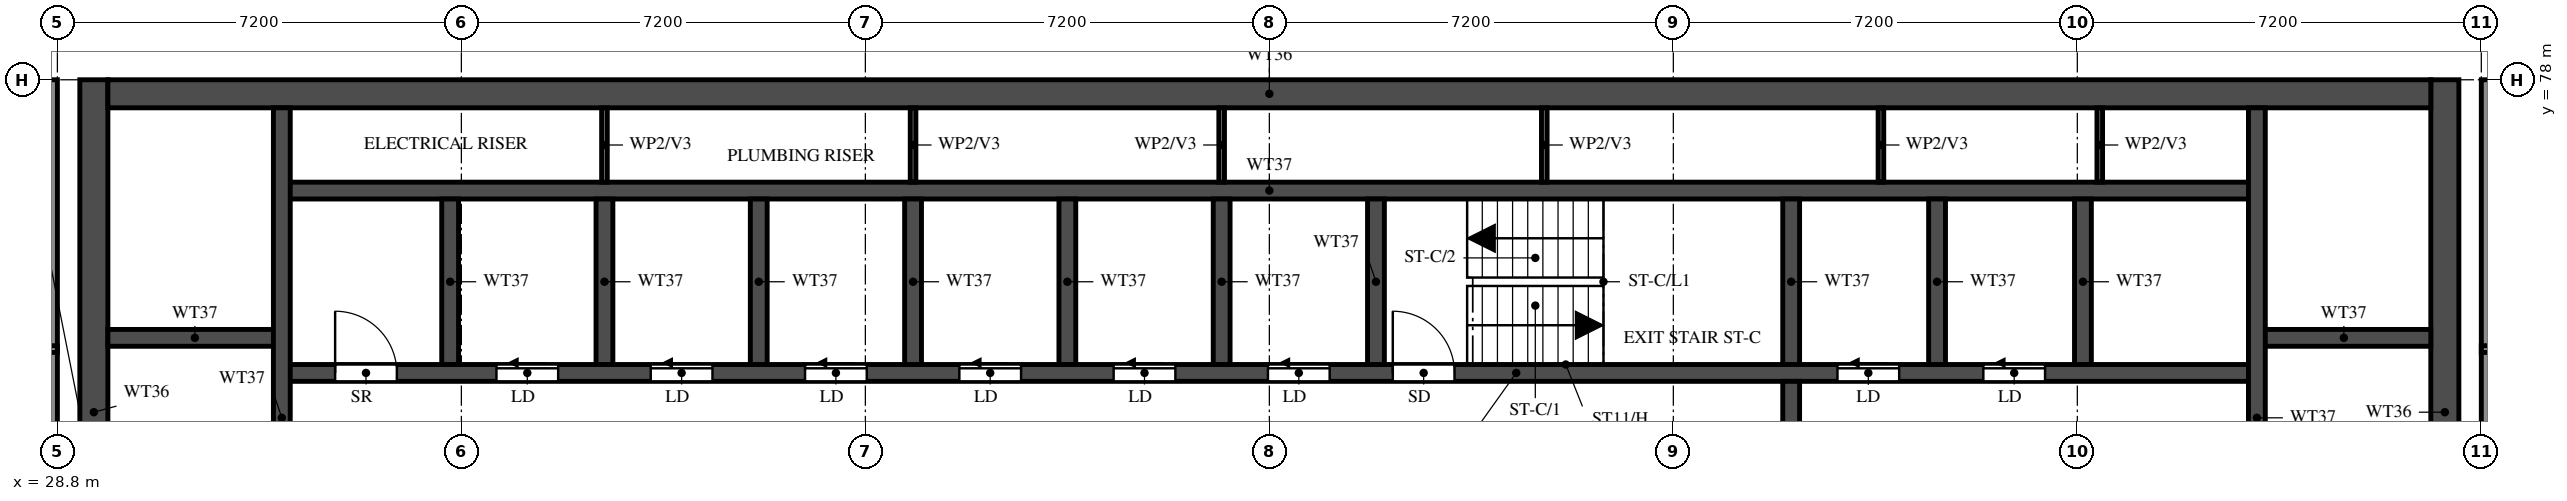
"""IFC4 building model, lengths in metres.
Left out: names, types, materials, properties, quantities, classifications, styles, units other than length and angle.
Written with IfcOpenShell. Run it as: python <this file> out.ifc"""

import sys

from ifc_helpers import new_model, si_unit, direction, frame, frame_2d, origin, place, context, subcontext, project, spatial, rectangle, extrude, element, fill, save


model = new_model("IFC4")
c1 = context("Model", 3, precision=1e-05, world=origin(), true_north=direction((0.0, 1.0)))
c2 = subcontext(c1, "Body", "Model", "MODEL_VIEW")
j1 = project(units=[si_unit("LENGTHUNIT", "METRE"), si_unit("PLANEANGLEUNIT", "RADIAN")], contexts=[c1])
p1 = place(None, origin())
s1 = spatial("IfcSite", under=j1, at=p1, CompositionType="ELEMENT")
p2 = place(p1, origin())
s2 = spatial("IfcBuilding", under=s1, at=p2, CompositionType="ELEMENT")
p3 = place(p2, frame((0.0, 0.0, 253.5)))
s3 = spatial("IfcBuildingStorey", under=s2, at=p3, CompositionType="ELEMENT", Elevation=253.5)
for number, where, z_axis, x_axis in (
    (1, (29.45, 66.15, 0.0), (0.0, 0.0, 1.0), (0.0, 1.0, 0.0)),
    (2, (71.35, 66.15, 0.0), (0.0, 0.0, 1.0), (0.0, 1.0, 0.0)),
):
    element("IfcWall", number, at=place(p3, frame(where, z_axis=z_axis, x_axis=x_axis)), inside=s3, PredefinedType="SHEAR", context=c2, shape_type="SweptSolid", body=[
        extrude(rectangle(XDim=11.85, YDim=0.5, at=frame_2d((5.925, 0.0))), origin(), (0.0, 0.0, 1.0), 3.22),
    ])
p4 = place(p3, frame((29.7, 77.75, 0.0), z_axis=(0.0, 0.0, 1.0), x_axis=(1.0, 0.0, 0.0)))
e3 = element("IfcWall", 3, at=p4, inside=s3, PredefinedType="SHEAR", context=c2, shape_type="SweptSolid", body=[
    extrude(rectangle(XDim=41.4, YDim=0.5, at=frame_2d((20.7, 0.0))), origin(), (0.0, 0.0, 1.0), 3.22),
])
p5 = place(p3, frame((32.8, 72.775, 0.0), z_axis=(0.0, 0.0, 1.0), x_axis=(1.0, 0.0, 0.0)))
e4 = element("IfcWall", 4, at=p5, inside=s3, PredefinedType="SHEAR", context=c2, shape_type="SweptSolid", body=[
    extrude(rectangle(XDim=35.2, YDim=0.3, at=frame_2d((17.6, 0.0))), origin(), (0.0, 0.0, 1.0), 3.22),
])
p6 = place(p5, frame((19.8, 0.0, 0.0)))
e5 = element("IfcOpeningElement", 5, at=p6, cuts=e4, PredefinedType="OPENING", context=c2, shape_type="SweptSolid", body=[
    extrude(rectangle(XDim=1.1, YDim=2.1, at=frame_2d((0.55, 1.05))), frame((0.0, 0.16, 0.0), z_axis=(0.0, -1.0, 0.0), x_axis=(1.0, 0.0, 0.0)), (0.0, 0.0, 1.0), 0.32),
])
p7 = place(p5, frame((27.725, 0.0, 0.0)))
e6 = element("IfcOpeningElement", 6, at=p7, cuts=e4, PredefinedType="OPENING", context=c2, shape_type="SweptSolid", body=[
    extrude(rectangle(XDim=1.1, YDim=2.1, at=frame_2d((0.55, 1.05))), frame((0.0, 0.16, 0.0), z_axis=(0.0, -1.0, 0.0), x_axis=(1.0, 0.0, 0.0)), (0.0, 0.0, 1.0), 0.32),
])
p8 = place(p5, frame((30.325, 0.0, 0.0)))
e7 = element("IfcOpeningElement", 7, at=p8, cuts=e4, PredefinedType="OPENING", context=c2, shape_type="SweptSolid", body=[
    extrude(rectangle(XDim=1.1, YDim=2.1, at=frame_2d((0.55, 1.05))), frame((0.0, 0.16, 0.0), z_axis=(0.0, -1.0, 0.0), x_axis=(1.0, 0.0, 0.0)), (0.0, 0.0, 1.0), 0.32),
])
p9 = place(p5, frame((3.825, 0.0, 0.0)))
e8 = element("IfcOpeningElement", 8, at=p9, cuts=e4, PredefinedType="OPENING", context=c2, shape_type="SweptSolid", body=[
    extrude(rectangle(XDim=1.1, YDim=2.1, at=frame_2d((0.55, 1.05))), frame((0.0, 0.16, 0.0), z_axis=(0.0, -1.0, 0.0), x_axis=(1.0, 0.0, 0.0)), (0.0, 0.0, 1.0), 0.32),
])
p10 = place(p5, frame((6.575, 0.0, 0.0)))
e9 = element("IfcOpeningElement", 9, at=p10, cuts=e4, PredefinedType="OPENING", context=c2, shape_type="SweptSolid", body=[
    extrude(rectangle(XDim=1.1, YDim=2.1, at=frame_2d((0.55, 1.05))), frame((0.0, 0.16, 0.0), z_axis=(0.0, -1.0, 0.0), x_axis=(1.0, 0.0, 0.0)), (0.0, 0.0, 1.0), 0.32),
])
p11 = place(p5, frame((9.325, 0.0, 0.0)))
e10 = element("IfcOpeningElement", 10, at=p11, cuts=e4, PredefinedType="OPENING", context=c2, shape_type="SweptSolid", body=[
    extrude(rectangle(XDim=1.1, YDim=2.1, at=frame_2d((0.55, 1.05))), frame((0.0, 0.16, 0.0), z_axis=(0.0, -1.0, 0.0), x_axis=(1.0, 0.0, 0.0)), (0.0, 0.0, 1.0), 0.32),
])
p12 = place(p5, frame((12.075, 0.0, 0.0)))
e11 = element("IfcOpeningElement", 11, at=p12, cuts=e4, PredefinedType="OPENING", context=c2, shape_type="SweptSolid", body=[
    extrude(rectangle(XDim=1.1, YDim=2.1, at=frame_2d((0.55, 1.05))), frame((0.0, 0.16, 0.0), z_axis=(0.0, -1.0, 0.0), x_axis=(1.0, 0.0, 0.0)), (0.0, 0.0, 1.0), 0.32),
])
p13 = place(p5, frame((14.825, 0.0, 0.0)))
e12 = element("IfcOpeningElement", 12, at=p13, cuts=e4, PredefinedType="OPENING", context=c2, shape_type="SweptSolid", body=[
    extrude(rectangle(XDim=1.1, YDim=2.1, at=frame_2d((0.55, 1.05))), frame((0.0, 0.16, 0.0), z_axis=(0.0, -1.0, 0.0), x_axis=(1.0, 0.0, 0.0)), (0.0, 0.0, 1.0), 0.32),
])
p14 = place(p5, frame((17.575, 0.0, 0.0)))
e13 = element("IfcOpeningElement", 13, at=p14, cuts=e4, PredefinedType="OPENING", context=c2, shape_type="SweptSolid", body=[
    extrude(rectangle(XDim=1.1, YDim=2.1, at=frame_2d((0.55, 1.05))), frame((0.0, 0.16, 0.0), z_axis=(0.0, -1.0, 0.0), x_axis=(1.0, 0.0, 0.0)), (0.0, 0.0, 1.0), 0.32),
])
p15 = place(p5, frame((0.95, 0.0, 0.0)))
e14 = element("IfcOpeningElement", 14, at=p15, cuts=e4, PredefinedType="OPENING", context=c2, shape_type="SweptSolid", body=[
    extrude(rectangle(XDim=1.1, YDim=2.1, at=frame_2d((0.55, 1.05))), frame((0.0, 0.16, 0.0), z_axis=(0.0, -1.0, 0.0), x_axis=(1.0, 0.0, 0.0)), (0.0, 0.0, 1.0), 0.32),
])
p16 = place(p3, frame((32.8, 76.025, 0.0), z_axis=(0.0, 0.0, 1.0), x_axis=(1.0, 0.0, 0.0)))
e15 = element("IfcWall", 15, at=p16, inside=s3, PredefinedType="SHEAR", context=c2, shape_type="SweptSolid", body=[
    extrude(rectangle(XDim=35.2, YDim=0.3, at=frame_2d((17.6, 0.0))), origin(), (0.0, 0.0, 1.0), 3.22),
])
for number, where, z_axis, x_axis in (
    (16, (29.7, 73.4, 0.0), (0.0, 0.0, 1.0), (1.0, 0.0, 0.0)),
    (17, (68.0, 73.4, 0.0), (0.0, 0.0, 1.0), (1.0, 0.0, 0.0)),
):
    element("IfcWall", number, at=place(p3, frame(where, z_axis=z_axis, x_axis=x_axis)), inside=s3, PredefinedType="SHEAR", context=c2, shape_type="SweptSolid", body=[
        extrude(rectangle(XDim=3.1, YDim=0.3, at=frame_2d((1.55, 0.0))), origin(), (0.0, 0.0, 1.0), 3.22),
    ])
p17 = place(p3, frame((32.8, 66.45, 0.0), z_axis=(0.0, 0.0, 1.0), x_axis=(0.0, 1.0, 0.0)))
e18 = element("IfcWall", 18, at=p17, inside=s3, PredefinedType="SHEAR", context=c2, shape_type="SweptSolid", body=[
    extrude(rectangle(XDim=11.05, YDim=0.3, at=frame_2d((5.525, 0.0))), origin(), (0.0, 0.0, 1.0), 3.22),
])
p18 = place(p3, frame((68.0, 66.45, 0.0), z_axis=(0.0, 0.0, 1.0), x_axis=(0.0, 1.0, 0.0)))
e19 = element("IfcWall", 19, at=p18, inside=s3, PredefinedType="SHEAR", context=c2, shape_type="SweptSolid", body=[
    extrude(rectangle(XDim=11.05, YDim=0.3, at=frame_2d((5.525, 0.0))), origin(), (0.0, 0.0, 1.0), 3.22),
])
p19 = place(p18, frame((0.15, 0.0, 0.0)))
e20 = element("IfcOpeningElement", 20, at=p19, cuts=e19, PredefinedType="OPENING", context=c2, shape_type="SweptSolid", body=[
    extrude(rectangle(XDim=1.1, YDim=2.1, at=frame_2d((0.55, 1.05))), frame((0.0, 0.16, 0.0), z_axis=(0.0, -1.0, 0.0), x_axis=(1.0, 0.0, 0.0)), (0.0, 0.0, 1.0), 0.32),
])
p20 = place(p3, frame((59.7, 66.45, 0.0), z_axis=(0.0, 0.0, 1.0), x_axis=(0.0, 1.0, 0.0)))
e21 = element("IfcWall", 21, at=p20, inside=s3, PredefinedType="SHEAR", context=c2, shape_type="SweptSolid", body=[
    extrude(rectangle(XDim=6.175, YDim=0.3, at=frame_2d((3.087, 0.0))), origin(), (0.0, 0.0, 1.0), 3.22),
])
p21 = place(p20, frame((3.85, 0.0, 0.0)))
e22 = element("IfcOpeningElement", 22, at=p21, cuts=e21, PredefinedType="OPENING", context=c2, shape_type="SweptSolid", body=[
    extrude(rectangle(XDim=1.2, YDim=2.1, at=frame_2d((0.6, 1.05))), frame((0.0, 0.16, 0.0), z_axis=(0.0, -1.0, 0.0), x_axis=(1.0, 0.0, 0.0)), (0.0, 0.0, 1.0), 0.32),
])
for number, where, z_axis, x_axis in (
    (23, (59.7, 72.925, 0.0), (0.0, 0.0, 1.0), (0.0, 1.0, 0.0)),
    (24, (35.8, 72.925, 0.0), (0.0, 0.0, 1.0), (0.0, 1.0, 0.0)),
    (25, (38.55, 72.925, 0.0), (0.0, 0.0, 1.0), (0.0, 1.0, 0.0)),
    (26, (41.3, 72.925, 0.0), (0.0, 0.0, 1.0), (0.0, 1.0, 0.0)),
    (27, (44.05, 72.925, 0.0), (0.0, 0.0, 1.0), (0.0, 1.0, 0.0)),
    (28, (46.8, 72.925, 0.0), (0.0, 0.0, 1.0), (0.0, 1.0, 0.0)),
    (29, (49.55, 72.925, 0.0), (0.0, 0.0, 1.0), (0.0, 1.0, 0.0)),
    (30, (52.3, 72.925, 0.0), (0.0, 0.0, 1.0), (0.0, 1.0, 0.0)),
    (31, (62.3, 72.925, 0.0), (0.0, 0.0, 1.0), (0.0, 1.0, 0.0)),
    (32, (64.9, 72.925, 0.0), (0.0, 0.0, 1.0), (0.0, 1.0, 0.0)),
):
    element("IfcWall", number, at=place(p3, frame(where, z_axis=z_axis, x_axis=x_axis)), inside=s3, PredefinedType="SHEAR", context=c2, shape_type="SweptSolid", body=[
        extrude(rectangle(XDim=2.95, YDim=0.3, at=frame_2d((1.475, 0.0))), origin(), (0.0, 0.0, 1.0), 3.22),
    ])
for number, where, z_axis, x_axis in (
    (33, (38.55, 76.175, 0.0), (0.0, 0.0, 1.0), (0.0, 1.0, 0.0)),
    (34, (44.05, 76.175, 0.0), (0.0, 0.0, 1.0), (0.0, 1.0, 0.0)),
    (35, (49.55, 76.175, 0.0), (0.0, 0.0, 1.0), (0.0, 1.0, 0.0)),
    (36, (55.3, 76.175, 0.0), (0.0, 0.0, 1.0), (0.0, 1.0, 0.0)),
    (37, (61.3, 76.175, 0.0), (0.0, 0.0, 1.0), (0.0, 1.0, 0.0)),
    (38, (65.2, 76.175, 0.0), (0.0, 0.0, 1.0), (0.0, 1.0, 0.0)),
):
    element("IfcWall", number, at=place(p3, frame(where, z_axis=z_axis, x_axis=x_axis)), inside=s3, PredefinedType="PARTITIONING", context=c2, shape_type="SweptSolid", body=[
        extrude(rectangle(XDim=1.325, YDim=0.1, at=frame_2d((0.663, 0.0))), origin(), (0.0, 0.0, 1.0), 3.22),
    ])
for number, where, z_axis, x_axis in (
    (39, (28.7, 62.4, 0.0), (0.0, 0.0, 1.0), (0.0, 1.0, 0.0)),
    (40, (72.1, 62.4, 0.0), (0.0, 0.0, 1.0), (0.0, 1.0, 0.0)),
):
    element("IfcWall", number, at=place(p3, frame(where, z_axis=z_axis, x_axis=x_axis)), inside=s3, PredefinedType="SOLIDWALL", context=c2, shape_type="SweptSolid", body=[
        extrude(rectangle(XDim=15.6, YDim=0.2, at=frame_2d((7.8, 0.0))), origin(), (0.0, 0.0, 1.0), 3.22),
    ])
p22 = place(p3, frame((18.525, 73.2, 0.0), z_axis=(0.0, 0.0, 1.0), x_axis=(1.0, 0.0, 0.0)))
e41 = element("IfcWall", 41, at=p22, inside=s3, PredefinedType="PARTITIONING", context=c2, shape_type="SweptSolid", body=[
    extrude(rectangle(XDim=10.275, YDim=0.12, at=frame_2d((5.138, 0.0))), origin(), (0.0, 0.0, 1.0), 2.32),
])
p23 = place(p22, frame((5.275, 0.0, 0.0)))
e42 = element("IfcOpeningElement", 42, at=p23, cuts=e41, PredefinedType="OPENING", context=c2, shape_type="SweptSolid", body=[
    extrude(rectangle(XDim=0.9, YDim=2.1, at=frame_2d((0.45, 1.05))), frame((0.0, 0.07, 0.0), z_axis=(0.0, -1.0, 0.0), x_axis=(1.0, 0.0, 0.0)), (0.0, 0.0, 1.0), 0.14),
])
p24 = place(p3, frame((72.0, 73.2, 0.0), z_axis=(0.0, 0.0, 1.0), x_axis=(1.0, 0.0, 0.0)))
e43 = element("IfcWall", 43, at=p24, inside=s3, PredefinedType="PARTITIONING", context=c2, shape_type="SweptSolid", body=[
    extrude(rectangle(XDim=10.275, YDim=0.12, at=frame_2d((5.137, 0.0))), origin(), (0.0, 0.0, 1.0), 2.32),
])
p25 = place(p24, frame((4.1, 0.0, 0.0)))
e44 = element("IfcOpeningElement", 44, at=p25, cuts=e43, PredefinedType="OPENING", context=c2, shape_type="SweptSolid", body=[
    extrude(rectangle(XDim=0.9, YDim=2.1, at=frame_2d((0.45, 1.05))), frame((0.0, 0.07, 0.0), z_axis=(0.0, -1.0, 0.0), x_axis=(1.0, 0.0, 0.0)), (0.0, 0.0, 1.0), 0.14),
])
p26 = place(p6, origin())
e45 = element("IfcDoor", 45, at=p26, inside=s3, OperationType="SINGLE_SWING_LEFT", PredefinedType="DOOR", context=c2, shape_type="SweptSolid", body=[
    extrude(rectangle(XDim=1.1, YDim=2.1, at=frame_2d((0.55, 1.05))), frame((0.0, 0.025, 0.0), z_axis=(0.0, -1.0, 0.0), x_axis=(1.0, 0.0, 0.0)), (0.0, 0.0, 1.0), 0.05),
])
fill(e5, e45)
p27 = place(p7, origin())
e46 = element("IfcDoor", 46, at=p27, inside=s3, OperationType="SLIDING_TO_LEFT", PredefinedType="DOOR", context=c2, shape_type="SweptSolid", body=[
    extrude(rectangle(XDim=1.1, YDim=2.1, at=frame_2d((0.55, 1.05))), frame((0.0, 0.025, 0.0), z_axis=(0.0, -1.0, 0.0), x_axis=(1.0, 0.0, 0.0)), (0.0, 0.0, 1.0), 0.05),
])
fill(e6, e46)
p28 = place(p8, origin())
e47 = element("IfcDoor", 47, at=p28, inside=s3, OperationType="SLIDING_TO_LEFT", PredefinedType="DOOR", context=c2, shape_type="SweptSolid", body=[
    extrude(rectangle(XDim=1.1, YDim=2.1, at=frame_2d((0.55, 1.05))), frame((0.0, 0.025, 0.0), z_axis=(0.0, -1.0, 0.0), x_axis=(1.0, 0.0, 0.0)), (0.0, 0.0, 1.0), 0.05),
])
fill(e7, e47)
p29 = place(p9, origin())
e48 = element("IfcDoor", 48, at=p29, inside=s3, OperationType="SLIDING_TO_LEFT", PredefinedType="DOOR", context=c2, shape_type="SweptSolid", body=[
    extrude(rectangle(XDim=1.1, YDim=2.1, at=frame_2d((0.55, 1.05))), frame((0.0, 0.025, 0.0), z_axis=(0.0, -1.0, 0.0), x_axis=(1.0, 0.0, 0.0)), (0.0, 0.0, 1.0), 0.05),
])
fill(e8, e48)
p30 = place(p10, origin())
e49 = element("IfcDoor", 49, at=p30, inside=s3, OperationType="SLIDING_TO_LEFT", PredefinedType="DOOR", context=c2, shape_type="SweptSolid", body=[
    extrude(rectangle(XDim=1.1, YDim=2.1, at=frame_2d((0.55, 1.05))), frame((0.0, 0.025, 0.0), z_axis=(0.0, -1.0, 0.0), x_axis=(1.0, 0.0, 0.0)), (0.0, 0.0, 1.0), 0.05),
])
fill(e9, e49)
p31 = place(p11, origin())
e50 = element("IfcDoor", 50, at=p31, inside=s3, OperationType="SLIDING_TO_LEFT", PredefinedType="DOOR", context=c2, shape_type="SweptSolid", body=[
    extrude(rectangle(XDim=1.1, YDim=2.1, at=frame_2d((0.55, 1.05))), frame((0.0, 0.025, 0.0), z_axis=(0.0, -1.0, 0.0), x_axis=(1.0, 0.0, 0.0)), (0.0, 0.0, 1.0), 0.05),
])
fill(e10, e50)
p32 = place(p12, origin())
e51 = element("IfcDoor", 51, at=p32, inside=s3, OperationType="SLIDING_TO_LEFT", PredefinedType="DOOR", context=c2, shape_type="SweptSolid", body=[
    extrude(rectangle(XDim=1.1, YDim=2.1, at=frame_2d((0.55, 1.05))), frame((0.0, 0.025, 0.0), z_axis=(0.0, -1.0, 0.0), x_axis=(1.0, 0.0, 0.0)), (0.0, 0.0, 1.0), 0.05),
])
fill(e11, e51)
p33 = place(p13, origin())
e52 = element("IfcDoor", 52, at=p33, inside=s3, OperationType="SLIDING_TO_LEFT", PredefinedType="DOOR", context=c2, shape_type="SweptSolid", body=[
    extrude(rectangle(XDim=1.1, YDim=2.1, at=frame_2d((0.55, 1.05))), frame((0.0, 0.025, 0.0), z_axis=(0.0, -1.0, 0.0), x_axis=(1.0, 0.0, 0.0)), (0.0, 0.0, 1.0), 0.05),
])
fill(e12, e52)
p34 = place(p14, origin())
e53 = element("IfcDoor", 53, at=p34, inside=s3, OperationType="SLIDING_TO_LEFT", PredefinedType="DOOR", context=c2, shape_type="SweptSolid", body=[
    extrude(rectangle(XDim=1.1, YDim=2.1, at=frame_2d((0.55, 1.05))), frame((0.0, 0.025, 0.0), z_axis=(0.0, -1.0, 0.0), x_axis=(1.0, 0.0, 0.0)), (0.0, 0.0, 1.0), 0.05),
])
fill(e13, e53)
p35 = place(p15, origin())
e54 = element("IfcDoor", 54, at=p35, inside=s3, OperationType="SINGLE_SWING_LEFT", PredefinedType="DOOR", context=c2, shape_type="SweptSolid", body=[
    extrude(rectangle(XDim=1.1, YDim=2.1, at=frame_2d((0.55, 1.05))), frame((0.0, 0.025, 0.0), z_axis=(0.0, -1.0, 0.0), x_axis=(1.0, 0.0, 0.0)), (0.0, 0.0, 1.0), 0.05),
])
fill(e14, e54)
save(model, sys.argv[1])
